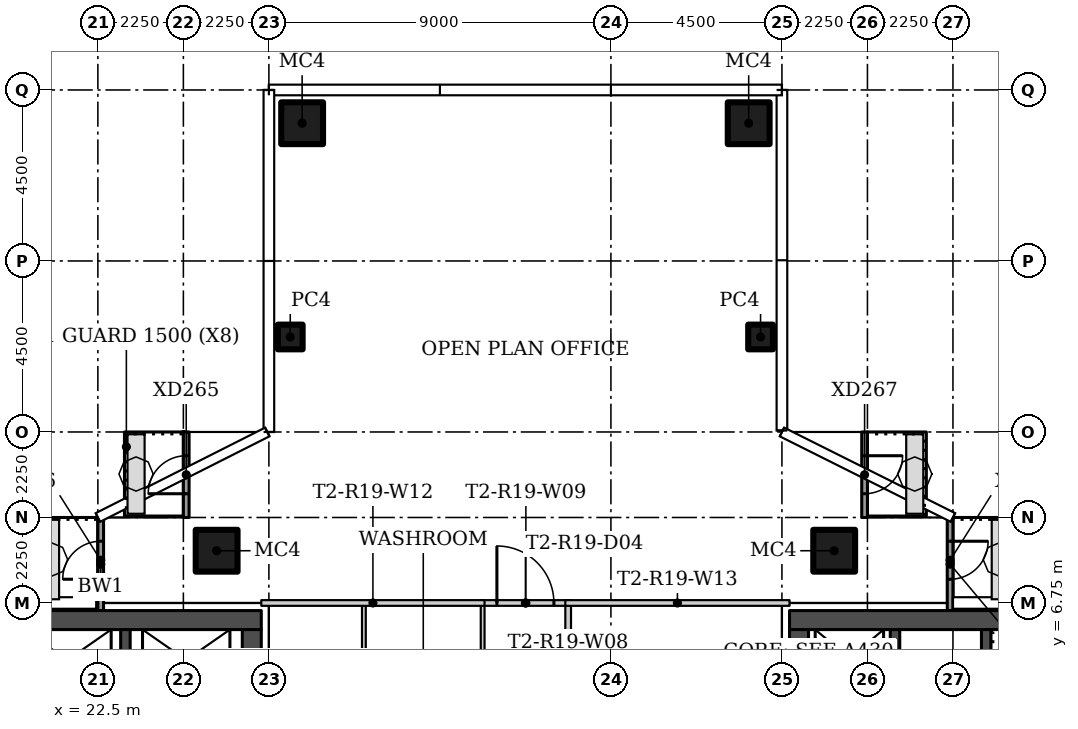
"""IFC4 building model, lengths in metres.
Left out: names, types, materials, properties, quantities, classifications, styles, units other than length and angle.
Written with IfcOpenShell. Run it as: python <this file> out.ifc"""

import sys

from ifc_helpers import new_model, si_unit, direction, frame, frame_2d, origin, origin_2d, place, context, subcontext, project, spatial, rectangle, hollow_rectangle, extrude, element, fill, save


model = new_model("IFC4")
c1 = context("Model", 3, precision=1e-05, world=origin(), true_north=direction((0.0, 1.0)))
c2 = subcontext(c1, "Body", "Model", "MODEL_VIEW")
j1 = project(units=[si_unit("LENGTHUNIT", "METRE"), si_unit("PLANEANGLEUNIT", "RADIAN")], contexts=[c1])
p1 = place(None, origin())
s1 = spatial("IfcSite", under=j1, at=p1, CompositionType="ELEMENT")
p2 = place(p1, origin())
s2 = spatial("IfcBuilding", under=s1, at=p2, CompositionType="ELEMENT")
p3 = place(p2, frame((0.0, 0.0, 174.0)))
s3 = spatial("IfcBuildingStorey", under=s2, at=p3, CompositionType="ELEMENT", Elevation=174.0)
for number, where in (
    (1, (25.625, 8.125, 0.0)),
    (2, (41.875, 8.125, 0.0)),
):
    element("IfcColumn", number, at=place(p3, frame(where)), inside=s3, PredefinedType="COLUMN", context=c2, shape_type="SweptSolid", body=[
        extrude(hollow_rectangle(XDim=1.1, YDim=1.1, WallThickness=0.04, at=origin_2d()), origin(), (0.0, 0.0, 1.0), 3.45),
    ])
p4 = place(p3, frame((39.938, 13.75, 0.0)))
e3 = element("IfcColumn", 3, at=p4, inside=s3, PredefinedType="COLUMN", context=c2, shape_type="SweptSolid", body=[
    extrude(hollow_rectangle(XDim=0.65, YDim=0.65, WallThickness=0.02, at=origin_2d()), origin(), (0.0, 0.0, 1.0), 3.45),
])
p5 = place(p3, frame((39.625, 19.375, 0.0)))
e4 = element("IfcColumn", 4, at=p5, inside=s3, PredefinedType="COLUMN", context=c2, shape_type="SweptSolid", body=[
    extrude(hollow_rectangle(XDim=1.1, YDim=1.1, WallThickness=0.04, at=origin_2d()), origin(), (0.0, 0.0, 1.0), 3.45),
])
p6 = place(p3, frame((27.562, 13.75, 0.0)))
e5 = element("IfcColumn", 5, at=p6, inside=s3, PredefinedType="COLUMN", context=c2, shape_type="SweptSolid", body=[
    extrude(hollow_rectangle(XDim=0.65, YDim=0.65, WallThickness=0.02, at=origin_2d()), origin(), (0.0, 0.0, 1.0), 3.45),
])
p7 = place(p3, frame((27.875, 19.375, 0.0)))
e6 = element("IfcColumn", 6, at=p7, inside=s3, PredefinedType="COLUMN", context=c2, shape_type="SweptSolid", body=[
    extrude(hollow_rectangle(XDim=1.1, YDim=1.1, WallThickness=0.04, at=origin_2d()), origin(), (0.0, 0.0, 1.0), 3.45),
])
p8 = place(p3, frame((32.625, 2.5, 0.0), z_axis=(0.0, 0.0, 1.0), x_axis=(0.0, 1.0, 0.0)))
e7 = element("IfcWall", 7, at=p8, inside=s3, PredefinedType="PARTITIONING", context=c2, shape_type="SweptSolid", body=[
    extrude(rectangle(XDim=4.175, YDim=0.1, at=frame_2d((2.087, 0.0))), origin(), (0.0, 0.0, 1.0), 3.45),
])
p9 = place(p3, frame((34.875, 6.675, 0.0), z_axis=(0.0, 0.0, 1.0), x_axis=(0.0, -1.0, 0.0)))
e8 = element("IfcWall", 8, at=p9, inside=s3, PredefinedType="PARTITIONING", context=c2, shape_type="SweptSolid", body=[
    extrude(rectangle(XDim=4.15, YDim=0.15, at=frame_2d((2.075, 0.0))), origin(), (0.0, 0.0, 1.0), 3.45),
])
p10 = place(p3, frame((32.575, 6.75, 0.0)))
e9 = element("IfcWall", 9, at=p10, inside=s3, PredefinedType="PARTITIONING", context=c2, shape_type="SweptSolid", body=[
    extrude(rectangle(XDim=2.375, YDim=0.15, at=frame_2d((1.188, 0.0))), origin(), (0.0, 0.0, 1.0), 3.45),
])
p11 = place(p10, frame((0.425, 0.0, 0.0)))
e10 = element("IfcOpeningElement", 10, at=p11, cuts=e9, PredefinedType="OPENING", context=c2, shape_type="SweptSolid", body=[
    extrude(rectangle(XDim=1.5, YDim=2.1, at=frame_2d((0.75, 1.05))), frame((0.0, 0.085, 0.0), z_axis=(0.0, -1.0, 0.0), x_axis=(1.0, 0.0, 0.0)), (0.0, 0.0, 1.0), 0.17),
])
p12 = place(p3, frame((29.5, 6.675, 0.0), z_axis=(0.0, 0.0, 1.0), x_axis=(0.0, -1.0, 0.0)))
e11 = element("IfcWall", 11, at=p12, inside=s3, PredefinedType="PARTITIONING", context=c2, shape_type="SweptSolid", body=[
    extrude(rectangle(XDim=4.175, YDim=0.1, at=frame_2d((2.087, 0.0))), origin(), (0.0, 0.0, 1.0), 3.45),
])
p13 = place(p3, frame((32.675, 6.75, 0.0), z_axis=(0.0, 0.0, 1.0), x_axis=(-1.0, 0.0, 0.0)))
e12 = element("IfcWall", 12, at=p13, inside=s3, PredefinedType="PARTITIONING", context=c2, shape_type="SweptSolid", body=[
    extrude(rectangle(XDim=5.875, YDim=0.15, at=frame_2d((2.938, 0.0))), origin(), (0.0, 0.0, 1.0), 3.45),
])
p14 = place(p3, frame((40.7, 6.75, 0.0), z_axis=(0.0, 0.0, 1.0), x_axis=(-1.0, 0.0, 0.0)))
e13 = element("IfcWall", 13, at=p14, inside=s3, PredefinedType="PARTITIONING", context=c2, shape_type="SweptSolid", body=[
    extrude(rectangle(XDim=5.9, YDim=0.15, at=frame_2d((2.95, 0.0))), origin(), (0.0, 0.0, 1.0), 3.45),
])
p15 = place(p3, frame((24.825, 9.0, 0.0), z_axis=(0.0, 0.0, 1.0), x_axis=(0.0, 1.0, 0.0)))
e14 = element("IfcWall", 14, at=p15, inside=s3, PredefinedType="SOLIDWALL", context=c2, shape_type="SweptSolid", body=[
    extrude(rectangle(XDim=2.25, YDim=0.15, at=frame_2d((1.125, 0.0))), origin(), (0.0, 0.0, 1.0), 3.45),
])
p16 = place(p15, frame((0.625, 0.0, 0.0)))
e15 = element("IfcOpeningElement", 15, at=p16, cuts=e14, PredefinedType="OPENING", context=c2, shape_type="SweptSolid", body=[
    extrude(rectangle(XDim=1.0, YDim=2.4, at=frame_2d((0.5, 1.2))), frame((0.0, 0.085, 0.0), z_axis=(0.0, -1.0, 0.0), x_axis=(1.0, 0.0, 0.0)), (0.0, 0.0, 1.0), 0.17),
])
p17 = place(p3, frame((22.575, 6.543, 0.0), z_axis=(0.0, 0.0, 1.0), x_axis=(0.0, 1.0, 0.0)))
e16 = element("IfcWall", 16, at=p17, inside=s3, PredefinedType="SOLIDWALL", context=c2, shape_type="SweptSolid", body=[
    extrude(rectangle(XDim=2.457, YDim=0.15, at=frame_2d((1.229, 0.0))), origin(), (0.0, 0.0, 1.0), 3.45),
])
p18 = place(p17, frame((0.832, 0.0, 0.0)))
e17 = element("IfcOpeningElement", 17, at=p18, cuts=e16, PredefinedType="OPENING", context=c2, shape_type="SweptSolid", body=[
    extrude(rectangle(XDim=1.0, YDim=2.4, at=frame_2d((0.5, 1.2))), frame((0.0, 0.085, 0.0), z_axis=(0.0, -1.0, 0.0), x_axis=(1.0, 0.0, 0.0)), (0.0, 0.0, 1.0), 0.17),
])
p19 = place(p3, frame((42.675, 11.25, 0.0), z_axis=(0.0, 0.0, 1.0), x_axis=(0.0, -1.0, 0.0)))
e18 = element("IfcWall", 18, at=p19, inside=s3, PredefinedType="SOLIDWALL", context=c2, shape_type="SweptSolid", body=[
    extrude(rectangle(XDim=2.25, YDim=0.15, at=frame_2d((1.125, 0.0))), origin(), (0.0, 0.0, 1.0), 3.45),
])
p20 = place(p19, frame((0.625, 0.0, 0.0)))
e19 = element("IfcOpeningElement", 19, at=p20, cuts=e18, PredefinedType="OPENING", context=c2, shape_type="SweptSolid", body=[
    extrude(rectangle(XDim=1.0, YDim=2.4, at=frame_2d((0.5, 1.2))), frame((0.0, 0.085, 0.0), z_axis=(0.0, -1.0, 0.0), x_axis=(1.0, 0.0, 0.0)), (0.0, 0.0, 1.0), 0.17),
])
p21 = place(p3, frame((44.925, 9.0, 0.0), z_axis=(0.0, 0.0, 1.0), x_axis=(0.0, -1.0, 0.0)))
e20 = element("IfcWall", 20, at=p21, inside=s3, PredefinedType="SOLIDWALL", context=c2, shape_type="SweptSolid", body=[
    extrude(rectangle(XDim=2.457, YDim=0.15, at=frame_2d((1.229, 0.0))), origin(), (0.0, 0.0, 1.0), 3.45),
])
p22 = place(p21, frame((0.625, 0.0, 0.0)))
e21 = element("IfcOpeningElement", 21, at=p22, cuts=e20, PredefinedType="OPENING", context=c2, shape_type="SweptSolid", body=[
    extrude(rectangle(XDim=1.0, YDim=2.4, at=frame_2d((0.5, 1.2))), frame((0.0, 0.085, 0.0), z_axis=(0.0, -1.0, 0.0), x_axis=(1.0, 0.0, 0.0)), (0.0, 0.0, 1.0), 0.17),
])
p23 = place(p3, frame((13.7, 6.3, 0.0)))
e22 = element("IfcWall", 22, at=p23, inside=s3, PredefinedType="SHEAR", context=c2, shape_type="SweptSolid", body=[
    extrude(rectangle(XDim=13.1, YDim=0.5, at=frame_2d((6.55, 0.0))), origin(), (0.0, 0.0, 1.0), 3.45),
])
p24 = place(p3, frame((26.55, 6.05, 0.0), z_axis=(0.0, 0.0, 1.0), x_axis=(0.0, -1.0, 0.0)))
e23 = element("IfcWall", 23, at=p24, inside=s3, PredefinedType="SHEAR", context=c2, shape_type="SweptSolid", body=[
    extrude(rectangle(XDim=12.1, YDim=0.5, at=frame_2d((6.05, 0.0))), origin(), (0.0, 0.0, 1.0), 3.45),
])
p25 = place(p24, frame((10.1, 0.0, 0.0)))
e24 = element("IfcOpeningElement", 24, at=p25, cuts=e23, PredefinedType="OPENING", context=c2, shape_type="SweptSolid", body=[
    extrude(rectangle(XDim=1.2, YDim=2.1, at=frame_2d((0.6, 1.05))), frame((0.0, 0.26, 0.0), z_axis=(0.0, -1.0, 0.0), x_axis=(1.0, 0.0, 0.0)), (0.0, 0.0, 1.0), 0.52),
])
p26 = place(p24, frame((3.9, 0.0, 0.0)))
e25 = element("IfcOpeningElement", 25, at=p26, cuts=e23, PredefinedType="OPENING", context=c2, shape_type="SweptSolid", body=[
    extrude(rectangle(XDim=1.8, YDim=2.4, at=frame_2d((0.9, 1.2))), frame((0.0, 0.26, 0.0), z_axis=(0.0, -1.0, 0.0), x_axis=(1.0, 0.0, 0.0)), (0.0, 0.0, 1.0), 0.52),
])
p27 = place(p3, frame((23.225, 3.25, 0.0), z_axis=(0.0, 0.0, 1.0), x_axis=(0.0, 1.0, 0.0)))
e26 = element("IfcWall", 26, at=p27, inside=s3, PredefinedType="SHEAR", context=c2, shape_type="SweptSolid", body=[
    extrude(rectangle(XDim=2.8, YDim=0.25, at=frame_2d((1.4, 0.0))), origin(), (0.0, 0.0, 1.0), 3.45),
])
p28 = place(p3, frame((53.8, 6.3, 0.0), z_axis=(0.0, 0.0, 1.0), x_axis=(-1.0, 0.0, 0.0)))
e27 = element("IfcWall", 27, at=p28, inside=s3, PredefinedType="SHEAR", context=c2, shape_type="SweptSolid", body=[
    extrude(rectangle(XDim=13.1, YDim=0.5, at=frame_2d((6.55, 0.0))), origin(), (0.0, 0.0, 1.0), 3.45),
])
p29 = place(p3, frame((40.95, -6.05, 0.0), z_axis=(0.0, 0.0, 1.0), x_axis=(0.0, 1.0, 0.0)))
e28 = element("IfcWall", 28, at=p29, inside=s3, PredefinedType="SHEAR", context=c2, shape_type="SweptSolid", body=[
    extrude(rectangle(XDim=12.1, YDim=0.5, at=frame_2d((6.05, 0.0))), origin(), (0.0, 0.0, 1.0), 3.45),
])
p30 = place(p29, frame((0.8, 0.0, 0.0)))
e29 = element("IfcOpeningElement", 29, at=p30, cuts=e28, PredefinedType="OPENING", context=c2, shape_type="SweptSolid", body=[
    extrude(rectangle(XDim=1.2, YDim=2.1, at=frame_2d((0.6, 1.05))), frame((0.0, 0.26, 0.0), z_axis=(0.0, -1.0, 0.0), x_axis=(1.0, 0.0, 0.0)), (0.0, 0.0, 1.0), 0.52),
])
p31 = place(p29, frame((6.4, 0.0, 0.0)))
e30 = element("IfcOpeningElement", 30, at=p31, cuts=e28, PredefinedType="OPENING", context=c2, shape_type="SweptSolid", body=[
    extrude(rectangle(XDim=1.8, YDim=2.4, at=frame_2d((0.9, 1.2))), frame((0.0, 0.26, 0.0), z_axis=(0.0, -1.0, 0.0), x_axis=(1.0, 0.0, 0.0)), (0.0, 0.0, 1.0), 0.52),
])
for number, where, z_axis, x_axis in (
    (31, (45.875, 3.25, 0.0), (0.0, 0.0, 1.0), (0.0, 1.0, 0.0)),
    (32, (43.475, 3.25, 0.0), (0.0, 0.0, 1.0), (0.0, 1.0, 0.0)),
):
    element("IfcWall", number, at=place(p3, frame(where, z_axis=z_axis, x_axis=x_axis)), inside=s3, PredefinedType="SHEAR", context=c2, shape_type="SweptSolid", body=[
        extrude(rectangle(XDim=2.8, YDim=0.25, at=frame_2d((1.4, 0.0))), origin(), (0.0, 0.0, 1.0), 3.45),
    ])
p32 = place(p11, origin())
e33 = element("IfcDoor", 33, at=p32, inside=s3, OperationType="DOUBLE_DOOR_SINGLE_SWING", PredefinedType="DOOR", context=c2, shape_type="SweptSolid", body=[
    extrude(rectangle(XDim=1.5, YDim=2.1, at=frame_2d((0.75, 1.05))), frame((0.0, 0.025, 0.0), z_axis=(0.0, -1.0, 0.0), x_axis=(1.0, 0.0, 0.0)), (0.0, 0.0, 1.0), 0.05),
])
fill(e10, e33)
p33 = place(p16, origin())
e34 = element("IfcDoor", 34, at=p33, inside=s3, OperationType="SINGLE_SWING_RIGHT", PredefinedType="DOOR", context=c2, shape_type="SweptSolid", body=[
    extrude(rectangle(XDim=1.0, YDim=2.4, at=frame_2d((0.5, 1.2))), frame((0.0, 0.025, 0.0), z_axis=(0.0, -1.0, 0.0), x_axis=(1.0, 0.0, 0.0)), (0.0, 0.0, 1.0), 0.05),
])
fill(e15, e34)
p34 = place(p18, origin())
e35 = element("IfcDoor", 35, at=p34, inside=s3, OperationType="SINGLE_SWING_LEFT", PredefinedType="DOOR", context=c2, shape_type="SweptSolid", body=[
    extrude(rectangle(XDim=1.0, YDim=2.4, at=frame_2d((0.5, 1.2))), frame((0.0, 0.025, 0.0), z_axis=(0.0, -1.0, 0.0), x_axis=(1.0, 0.0, 0.0)), (0.0, 0.0, 1.0), 0.05),
])
fill(e17, e35)
p35 = place(p20, origin())
e36 = element("IfcDoor", 36, at=p35, inside=s3, OperationType="SINGLE_SWING_RIGHT", PredefinedType="DOOR", context=c2, shape_type="SweptSolid", body=[
    extrude(rectangle(XDim=1.0, YDim=2.4, at=frame_2d((0.5, 1.2))), frame((0.0, 0.025, 0.0), z_axis=(0.0, -1.0, 0.0), x_axis=(1.0, 0.0, 0.0)), (0.0, 0.0, 1.0), 0.05),
])
fill(e19, e36)
p36 = place(p22, origin())
e37 = element("IfcDoor", 37, at=p36, inside=s3, OperationType="SINGLE_SWING_LEFT", PredefinedType="DOOR", context=c2, shape_type="SweptSolid", body=[
    extrude(rectangle(XDim=1.0, YDim=2.4, at=frame_2d((0.5, 1.2))), frame((0.0, 0.025, 0.0), z_axis=(0.0, -1.0, 0.0), x_axis=(1.0, 0.0, 0.0)), (0.0, 0.0, 1.0), 0.05),
])
fill(e21, e37)
save(model, sys.argv[1])
